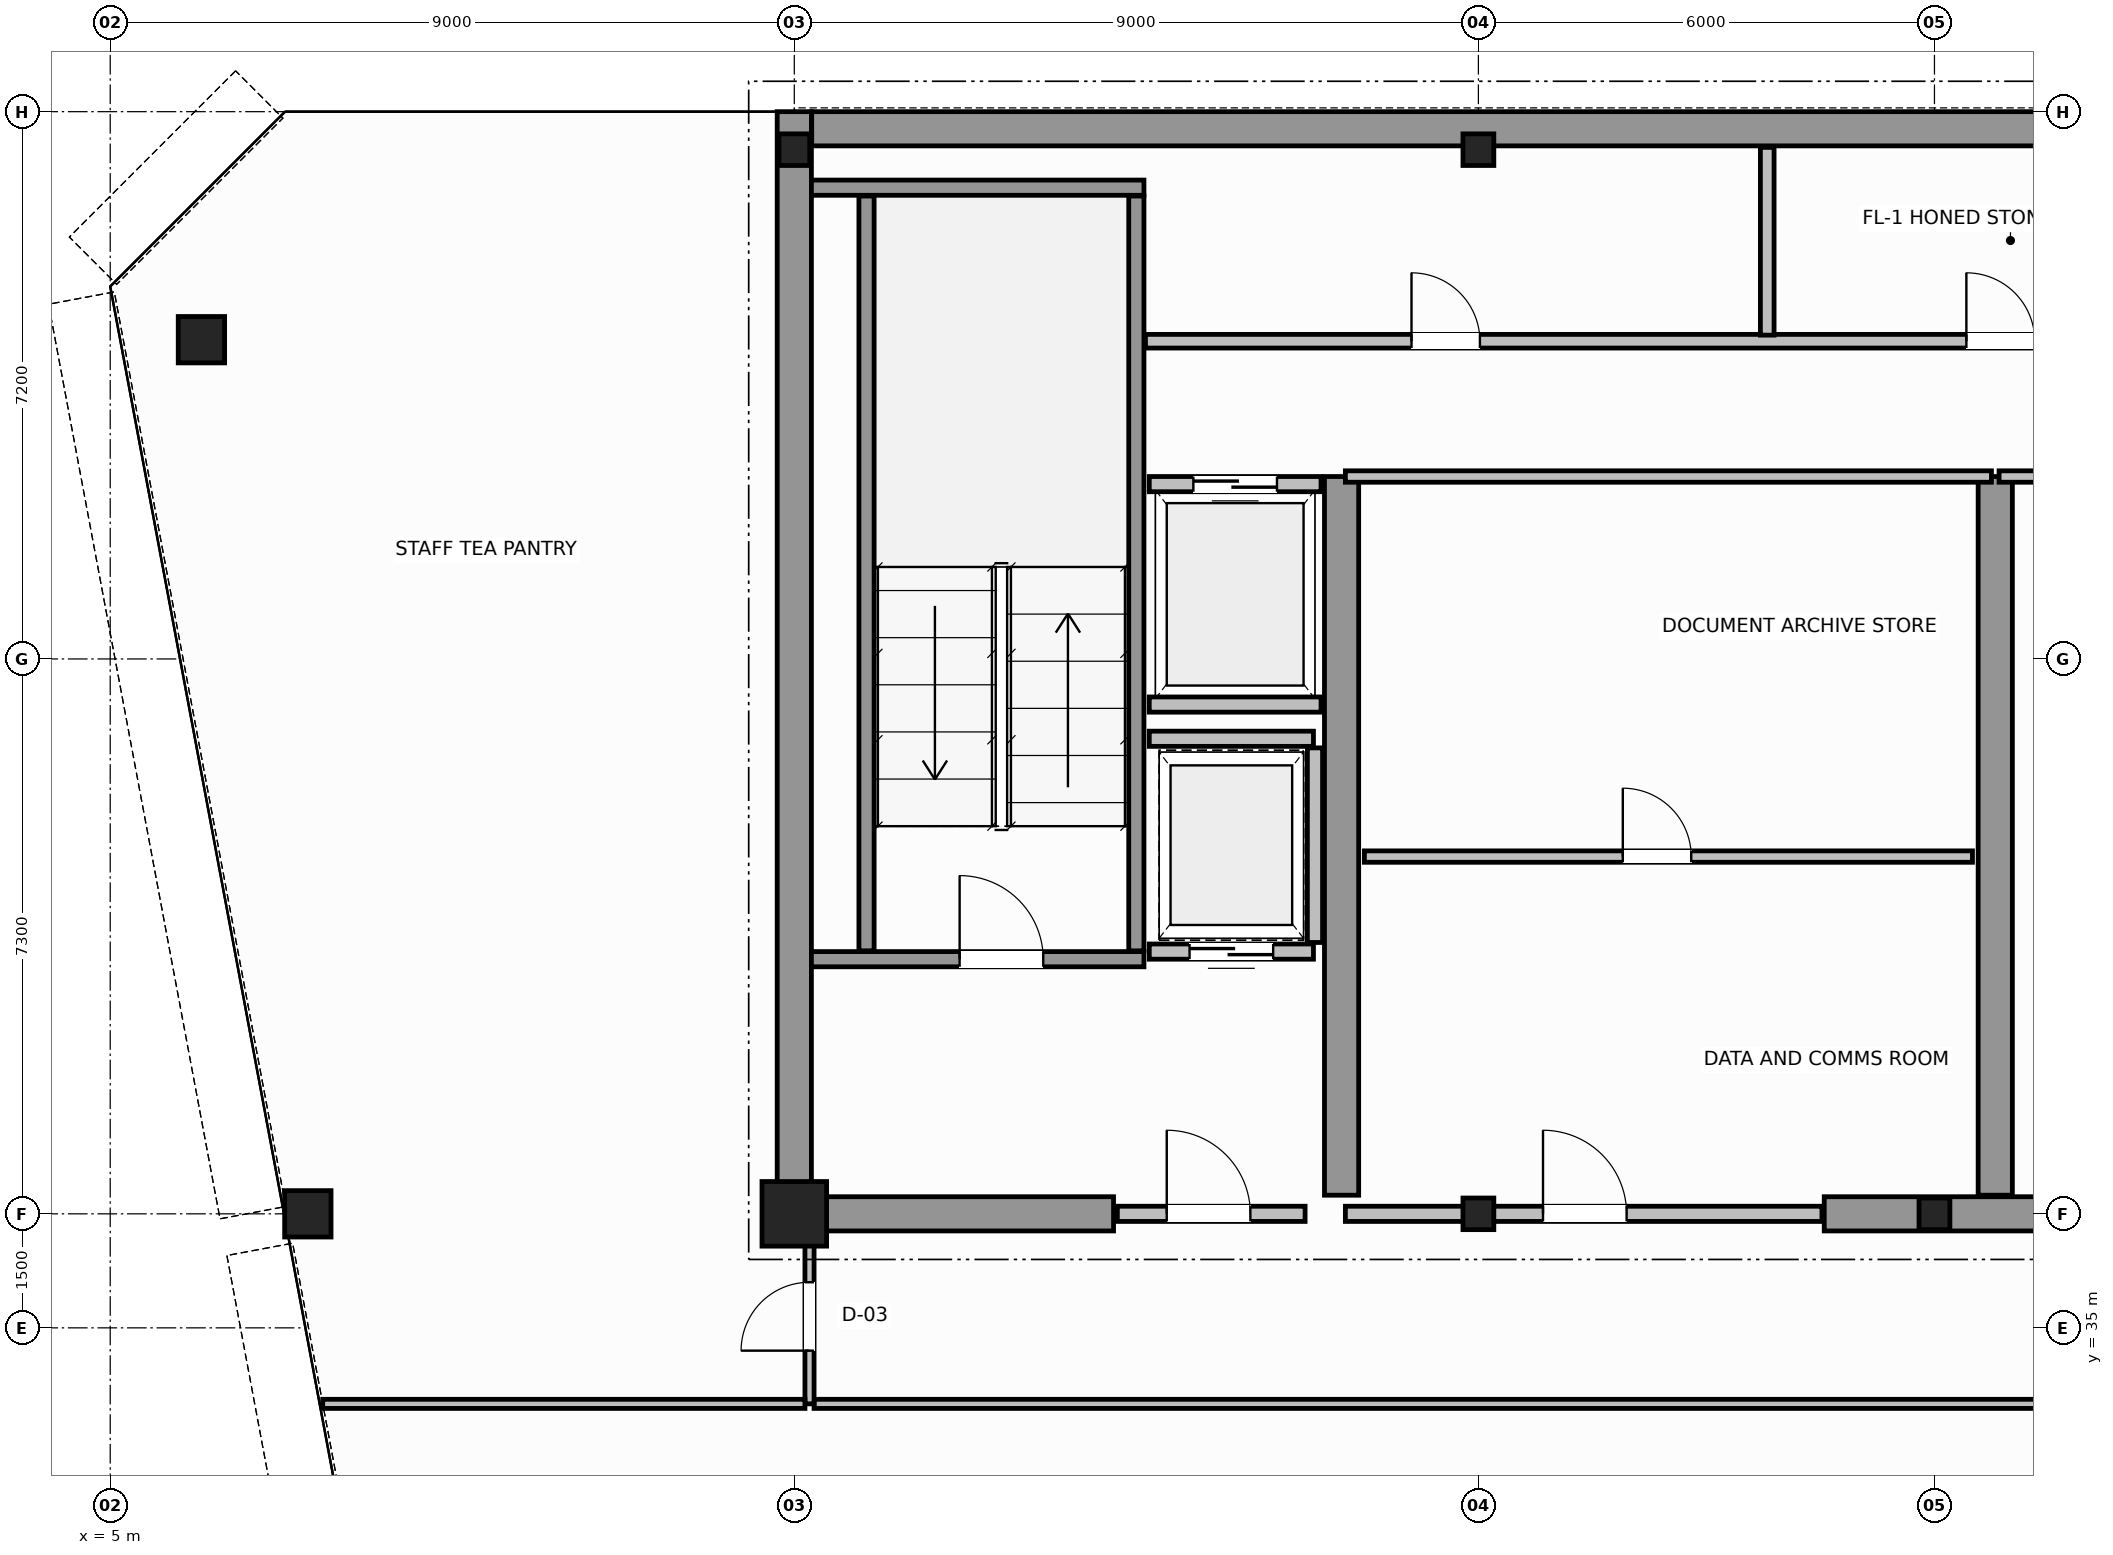
"""IFC4 building model, lengths in metres.
Left out: names, types, materials, properties, quantities, classifications, styles, units other than length and angle.
Written with IfcOpenShell. Run it as: python <this file> out.ifc"""

import sys

from ifc_helpers import new_model, si_unit, direction, frame, frame_2d, origin, origin_2d, place, context, subcontext, project, spatial, rectangle, hollow_circle, i_section, extrude, source, transform, mapped, element, fill, save


model = new_model("IFC4")
c1 = context("Model", 3, precision=1e-05, world=origin(), true_north=direction((0.0, 1.0)))
c2 = subcontext(c1, "Body", "Model", "MODEL_VIEW")
j1 = project(units=[si_unit("LENGTHUNIT", "METRE"), si_unit("PLANEANGLEUNIT", "RADIAN")], contexts=[c1])
p1 = place(None, origin())
s1 = spatial("IfcSite", under=j1, at=p1, CompositionType="ELEMENT")
p2 = place(p1, origin())
s2 = spatial("IfcBuilding", under=s1, at=p2, CompositionType="ELEMENT")
p3 = place(p2, frame((0.0, 0.0, 287.8)))
s3 = spatial("IfcBuildingStorey", under=s2, at=p3, CompositionType="ELEMENT", Elevation=287.8)
m1 = source(origin(), c2, "Body", "SweptSolid", [
    extrude(rectangle(XDim=0.85, YDim=0.85, at=origin_2d()), origin(), (0.0, 0.0, 1.0), 3.8),
])
p4 = place(p3, frame((14.0, 36.5, 0.0), z_axis=(0.0, 0.0, 1.0), x_axis=(1.0, 0.0, 0.0)))
e1 = element("IfcColumn", 1, at=p4, inside=s3, PredefinedType="COLUMN", context=c2, shape_type="MappedRepresentation", body=[
    mapped(m1, transform((0.0, 0.0, 0.0), scale=1.0)),
])
m2 = source(origin(), c2, "Body", "SweptSolid", [
    extrude(i_section(OverallWidth=0.406, OverallDepth=0.416, WebThickness=0.03, FlangeThickness=0.042, FilletRadius=0.015, at=origin_2d()), origin(), (0.0, 0.0, 1.0), 3.8),
])
for number, where, z_axis, x_axis in (
    (2, (23.0, 36.5, 0.0), (0.0, 0.0, 1.0), (1.0, 0.0, 0.0)),
    (3, (29.0, 36.5, 0.0), (0.0, 0.0, 1.0), (1.0, 0.0, 0.0)),
    (4, (14.0, 50.5, 0.0), (0.0, 0.0, 1.0), (1.0, 0.0, 0.0)),
    (5, (23.0, 50.5, 0.0), (0.0, 0.0, 1.0), (1.0, 0.0, 0.0)),
):
    element("IfcColumn", number, at=place(p3, frame(where, z_axis=z_axis, x_axis=x_axis)), inside=s3, PredefinedType="COLUMN", context=c2, shape_type="MappedRepresentation", body=[
        mapped(m2, transform((0.0, 0.0, 0.0), scale=1.0)),
    ])
m3 = source(origin(), c2, "Body", "SweptSolid", [
    extrude(hollow_circle(Radius=0.305, WallThickness=0.03, at=origin_2d()), origin(), (0.0, 0.0, 1.0), 3.8),
])
for number, where, z_axis, x_axis in (
    (6, (6.2, 48.0, 0.0), (0.0, 0.0, 1.0), (1.0, 0.0, 0.0)),
    (7, (7.6, 36.5, 0.0), (0.0, 0.0, 1.0), (1.0, 0.0, 0.0)),
):
    element("IfcColumn", number, at=place(p3, frame(where, z_axis=z_axis, x_axis=x_axis)), inside=s3, PredefinedType="COLUMN", context=c2, shape_type="MappedRepresentation", body=[
        mapped(m3, transform((0.0, 0.0, 0.0), scale=1.0)),
    ])
p5 = place(p3, frame((14.229, 50.775, 0.0), z_axis=(0.0, 0.0, 1.0), x_axis=(1.0, 0.0, 0.0)))
e8 = element("IfcWall", 8, at=p5, inside=s3, PredefinedType="SHEAR", context=c2, shape_type="SweptSolid", body=[
    extrude(rectangle(XDim=19.769, YDim=0.45, at=frame_2d((9.885, 0.0))), origin(), (0.0, 0.0, 1.0), 3.8),
])
p6 = place(p3, frame((14.0, 36.5, 0.0), z_axis=(0.0, 0.0, 1.0), x_axis=(0.0, 1.0, 0.0)))
e9 = element("IfcWall", 9, at=p6, inside=s3, PredefinedType="SHEAR", context=c2, shape_type="SweptSolid", body=[
    extrude(rectangle(XDim=14.5, YDim=0.45, at=frame_2d((7.25, 0.0))), origin(), (0.0, 0.0, 1.0), 3.8),
])
p7 = place(p3, frame((14.245, 36.5, 0.0), z_axis=(0.0, 0.0, 1.0), x_axis=(1.0, 0.0, 0.0)))
e10 = element("IfcWall", 10, at=p7, inside=s3, PredefinedType="SHEAR", context=c2, shape_type="SweptSolid", body=[
    extrude(rectangle(XDim=3.955, YDim=0.45, at=frame_2d((1.978, 0.0))), origin(), (0.0, 0.0, 1.0), 2.58),
])
p8 = place(p3, frame((27.55, 36.5, 0.0), z_axis=(0.0, 0.0, 1.0), x_axis=(1.0, 0.0, 0.0)))
e11 = element("IfcWall", 11, at=p8, inside=s3, PredefinedType="SHEAR", context=c2, shape_type="SweptSolid", body=[
    extrude(rectangle(XDim=4.5, YDim=0.45, at=frame_2d((2.25, 0.0))), origin(), (0.0, 0.0, 1.0), 3.8),
])
for number, where, z_axis, x_axis in (
    (12, (21.2, 36.745, 0.0), (0.0, 0.0, 1.0), (0.0, 1.0, 0.0)),
    (13, (29.8, 36.745, 0.0), (0.0, 0.0, 1.0), (0.0, 1.0, 0.0)),
):
    element("IfcWall", number, at=place(p3, frame(where, z_axis=z_axis, x_axis=x_axis)), inside=s3, PredefinedType="SHEAR", context=c2, shape_type="SweptSolid", body=[
        extrude(rectangle(XDim=9.455, YDim=0.45, at=frame_2d((4.728, 0.0))), origin(), (0.0, 0.0, 1.0), 3.8),
    ])
p9 = place(p3, frame((14.225, 39.85, 0.0), z_axis=(0.0, 0.0, 1.0), x_axis=(1.0, 0.0, 0.0)))
e14 = element("IfcWall", 14, at=p9, inside=s3, PredefinedType="SOLIDWALL", context=c2, shape_type="SweptSolid", body=[
    extrude(rectangle(XDim=4.375, YDim=0.2, at=frame_2d((2.188, 0.0))), origin(), (0.0, 0.0, 1.0), 3.8),
])
p10 = place(p9, frame((1.95, 0.0, 0.0)))
e15 = element("IfcOpeningElement", 15, at=p10, cuts=e14, PredefinedType="OPENING", context=c2, shape_type="SweptSolid", body=[
    extrude(rectangle(XDim=1.1, YDim=2.15, at=frame_2d((0.55, 1.075))), frame((0.0, 0.11, 0.0), z_axis=(0.0, -1.0, 0.0), x_axis=(1.0, 0.0, 0.0)), (0.0, 0.0, 1.0), 0.22),
])
p11 = place(p3, frame((14.225, 50.0, 0.0), z_axis=(0.0, 0.0, 1.0), x_axis=(1.0, 0.0, 0.0)))
e16 = element("IfcWall", 16, at=p11, inside=s3, PredefinedType="SOLIDWALL", context=c2, shape_type="SweptSolid", body=[
    extrude(rectangle(XDim=4.375, YDim=0.2, at=frame_2d((2.188, 0.0))), origin(), (0.0, 0.0, 1.0), 3.8),
])
for number, where, z_axis, x_axis in (
    (17, (14.95, 39.96, 0.0), (0.0, 0.0, 1.0), (0.0, 1.0, 0.0)),
    (18, (18.5, 39.96, 0.0), (0.0, 0.0, 1.0), (0.0, 1.0, 0.0)),
):
    element("IfcWall", number, at=place(p3, frame(where, z_axis=z_axis, x_axis=x_axis)), inside=s3, PredefinedType="SOLIDWALL", context=c2, shape_type="SweptSolid", body=[
        extrude(rectangle(XDim=9.93, YDim=0.2, at=frame_2d((4.965, 0.0))), origin(), (0.0, 0.0, 1.0), 3.8),
    ])
p12 = place(p3, frame((18.25, 36.5, 0.0), z_axis=(0.0, 0.0, 1.0), x_axis=(1.0, 0.0, 0.0)))
e19 = element("IfcWall", 19, at=p12, inside=s3, PredefinedType="SOLIDWALL", context=c2, shape_type="SweptSolid", body=[
    extrude(rectangle(XDim=2.47, YDim=0.2, at=frame_2d((1.235, 0.0))), origin(), (0.0, 0.0, 1.0), 2.57),
])
p13 = place(p12, frame((0.65, 0.0, 0.0)))
e20 = element("IfcOpeningElement", 20, at=p13, cuts=e19, PredefinedType="OPENING", context=c2, shape_type="SweptSolid", body=[
    extrude(rectangle(XDim=1.1, YDim=2.15, at=frame_2d((0.55, 1.075))), frame((0.0, 0.11, 0.0), z_axis=(0.0, -1.0, 0.0), x_axis=(1.0, 0.0, 0.0)), (0.0, 0.0, 1.0), 0.22),
])
p14 = place(p3, frame((18.67, 46.1, 0.0), z_axis=(0.0, 0.0, 1.0), x_axis=(1.0, 0.0, 0.0)))
e21 = element("IfcWall", 21, at=p14, inside=s3, PredefinedType="SOLIDWALL", context=c2, shape_type="SweptSolid", body=[
    extrude(rectangle(XDim=2.26, YDim=0.2, at=frame_2d((1.13, 0.0))), origin(), (0.0, 0.0, 1.0), 3.58),
])
p15 = place(p14, frame((0.58, 0.0, 0.0)))
e22 = element("IfcOpeningElement", 22, at=p15, cuts=e21, PredefinedType="OPENING", context=c2, shape_type="SweptSolid", body=[
    extrude(rectangle(XDim=1.1, YDim=2.15, at=frame_2d((0.55, 1.075))), frame((0.0, 0.11, 0.0), z_axis=(0.0, -1.0, 0.0), x_axis=(1.0, 0.0, 0.0)), (0.0, 0.0, 1.0), 0.22),
])
p16 = place(p3, frame((18.67, 43.2, 0.0), z_axis=(0.0, 0.0, 1.0), x_axis=(1.0, 0.0, 0.0)))
e23 = element("IfcWall", 23, at=p16, inside=s3, PredefinedType="SOLIDWALL", context=c2, shape_type="SweptSolid", body=[
    extrude(rectangle(XDim=2.26, YDim=0.2, at=frame_2d((1.13, 0.0))), origin(), (0.0, 0.0, 1.0), 3.58),
])
p17 = place(p3, frame((18.67, 39.95, 0.0), z_axis=(0.0, 0.0, 1.0), x_axis=(1.0, 0.0, 0.0)))
e24 = element("IfcWall", 24, at=p17, inside=s3, PredefinedType="SOLIDWALL", context=c2, shape_type="SweptSolid", body=[
    extrude(rectangle(XDim=2.16, YDim=0.2, at=frame_2d((1.08, 0.0))), origin(), (0.0, 0.0, 1.0), 3.58),
])
p18 = place(p17, frame((0.53, 0.0, 0.0)))
e25 = element("IfcOpeningElement", 25, at=p18, cuts=e24, PredefinedType="OPENING", context=c2, shape_type="SweptSolid", body=[
    extrude(rectangle(XDim=1.1, YDim=2.15, at=frame_2d((0.55, 1.075))), frame((0.0, 0.11, 0.0), z_axis=(0.0, -1.0, 0.0), x_axis=(1.0, 0.0, 0.0)), (0.0, 0.0, 1.0), 0.22),
])
p19 = place(p3, frame((18.67, 42.75, 0.0), z_axis=(0.0, 0.0, 1.0), x_axis=(1.0, 0.0, 0.0)))
e26 = element("IfcWall", 26, at=p19, inside=s3, PredefinedType="SOLIDWALL", context=c2, shape_type="SweptSolid", body=[
    extrude(rectangle(XDim=2.16, YDim=0.2, at=frame_2d((1.08, 0.0))), origin(), (0.0, 0.0, 1.0), 3.58),
])
p20 = place(p3, frame((20.85, 40.07, 0.0), z_axis=(0.0, 0.0, 1.0), x_axis=(0.0, 1.0, 0.0)))
e27 = element("IfcWall", 27, at=p20, inside=s3, PredefinedType="SOLIDWALL", context=c2, shape_type="SweptSolid", body=[
    extrude(rectangle(XDim=2.56, YDim=0.2, at=frame_2d((1.28, 0.0))), origin(), (0.0, 0.0, 1.0), 3.58),
])
p21 = place(p3, frame((21.25, 36.5, 0.0), z_axis=(0.0, 0.0, 1.0), x_axis=(1.0, 0.0, 0.0)))
e28 = element("IfcWall", 28, at=p21, inside=s3, PredefinedType="SOLIDWALL", context=c2, shape_type="SweptSolid", body=[
    extrude(rectangle(XDim=6.27, YDim=0.2, at=frame_2d((3.135, 0.0))), origin(), (0.0, 0.0, 1.0), 2.57),
])
p22 = place(p21, frame((2.6, 0.0, 0.0)))
e29 = element("IfcOpeningElement", 29, at=p22, cuts=e28, PredefinedType="OPENING", context=c2, shape_type="SweptSolid", body=[
    extrude(rectangle(XDim=1.1, YDim=2.15, at=frame_2d((0.55, 1.075))), frame((0.0, 0.11, 0.0), z_axis=(0.0, -1.0, 0.0), x_axis=(1.0, 0.0, 0.0)), (0.0, 0.0, 1.0), 0.22),
])
p23 = place(p3, frame((21.25, 46.2, 0.0), z_axis=(0.0, 0.0, 1.0), x_axis=(1.0, 0.0, 0.0)))
e30 = element("IfcWall", 30, at=p23, inside=s3, PredefinedType="PARTITIONING", context=c2, shape_type="SweptSolid", body=[
    extrude(rectangle(XDim=8.5, YDim=0.15, at=frame_2d((4.25, 0.0))), origin(), (0.0, 0.0, 1.0), 3.58),
])
p24 = place(p3, frame((21.5, 41.2, 0.0), z_axis=(0.0, 0.0, 1.0), x_axis=(1.0, 0.0, 0.0)))
e31 = element("IfcWall", 31, at=p24, inside=s3, PredefinedType="PARTITIONING", context=c2, shape_type="SweptSolid", body=[
    extrude(rectangle(XDim=8.0, YDim=0.15, at=frame_2d((4.0, 0.0))), origin(), (0.0, 0.0, 1.0), 3.58),
])
p25 = place(p24, frame((3.4, 0.0, 0.0)))
e32 = element("IfcOpeningElement", 32, at=p25, cuts=e31, PredefinedType="OPENING", context=c2, shape_type="SweptSolid", body=[
    extrude(rectangle(XDim=0.9, YDim=2.1, at=frame_2d((0.45, 1.05))), frame((0.0, 0.085, 0.0), z_axis=(0.0, -1.0, 0.0), x_axis=(1.0, 0.0, 0.0)), (0.0, 0.0, 1.0), 0.17),
])
p26 = place(p3, frame((29.85, 46.2, 0.0), z_axis=(0.0, 0.0, 1.0), x_axis=(1.0, 0.0, 0.0)))
e33 = element("IfcWall", 33, at=p26, inside=s3, PredefinedType="PARTITIONING", context=c2, shape_type="SweptSolid", body=[
    extrude(rectangle(XDim=8.5, YDim=0.15, at=frame_2d((4.25, 0.0))), origin(), (0.0, 0.0, 1.0), 3.58),
])
p27 = place(p3, frame((18.62, 47.98, 0.0), z_axis=(0.0, 0.0, 1.0), x_axis=(1.0, 0.0, 0.0)))
e34 = element("IfcWall", 34, at=p27, inside=s3, PredefinedType="PLUMBINGWALL", context=c2, shape_type="SweptSolid", body=[
    extrude(rectangle(XDim=20.06, YDim=0.18, at=frame_2d((10.03, 0.0))), origin(), (0.0, 0.0, 1.0), 3.58),
])
p28 = place(p27, frame((3.5, 0.0, 0.0)))
e35 = element("IfcOpeningElement", 35, at=p28, cuts=e34, PredefinedType="OPENING", context=c2, shape_type="SweptSolid", body=[
    extrude(rectangle(XDim=0.9, YDim=2.15, at=frame_2d((0.45, 1.075))), frame((0.0, 0.1, 0.0), z_axis=(0.0, -1.0, 0.0), x_axis=(1.0, 0.0, 0.0)), (0.0, 0.0, 1.0), 0.2),
])
p29 = place(p27, frame((10.8, 0.0, 0.0)))
e36 = element("IfcOpeningElement", 36, at=p29, cuts=e34, PredefinedType="OPENING", context=c2, shape_type="SweptSolid", body=[
    extrude(rectangle(XDim=0.9, YDim=2.15, at=frame_2d((0.45, 1.075))), frame((0.0, 0.1, 0.0), z_axis=(0.0, -1.0, 0.0), x_axis=(1.0, 0.0, 0.0)), (0.0, 0.0, 1.0), 0.2),
])
p30 = place(p27, frame((16.8, 0.0, 0.0)))
e37 = element("IfcOpeningElement", 37, at=p30, cuts=e34, PredefinedType="OPENING", context=c2, shape_type="SweptSolid", body=[
    extrude(rectangle(XDim=0.9, YDim=2.15, at=frame_2d((0.45, 1.075))), frame((0.0, 0.1, 0.0), z_axis=(0.0, -1.0, 0.0), x_axis=(1.0, 0.0, 0.0)), (0.0, 0.0, 1.0), 0.2),
])
p31 = place(p3, frame((26.8, 48.06, 0.0), z_axis=(0.0, 0.0, 1.0), x_axis=(0.0, 1.0, 0.0)))
e38 = element("IfcWall", 38, at=p31, inside=s3, PredefinedType="PLUMBINGWALL", context=c2, shape_type="SweptSolid", body=[
    extrude(rectangle(XDim=2.47, YDim=0.18, at=frame_2d((1.235, 0.0))), origin(), (0.0, 0.0, 1.0), 3.58),
])
p32 = place(p3, frame((14.26, 34.0, 0.0), z_axis=(0.0, 0.0, 1.0), x_axis=(1.0, 0.0, 0.0)))
e39 = element("IfcWall", 39, at=p32, inside=s3, PredefinedType="PARTITIONING", context=c2, shape_type="SweptSolid", body=[
    extrude(rectangle(XDim=26.48, YDim=0.12, at=frame_2d((13.24, 0.0))), origin(), (0.0, 0.0, 1.0), 3.58),
])
p33 = place(p3, frame((14.2, 34.0, 0.0), z_axis=(0.0, 0.0, 1.0), x_axis=(0.0, 1.0, 0.0)))
e40 = element("IfcWall", 40, at=p33, inside=s3, PredefinedType="PARTITIONING", context=c2, shape_type="SweptSolid", body=[
    extrude(rectangle(XDim=2.44, YDim=0.12, at=frame_2d((1.22, 0.0))), origin(), (0.0, 0.0, 1.0), 3.58),
])
p34 = place(p33, frame((0.7, 0.0, 0.0)))
e41 = element("IfcOpeningElement", 41, at=p34, cuts=e40, PredefinedType="OPENING", context=c2, shape_type="SweptSolid", body=[
    extrude(rectangle(XDim=0.9, YDim=2.15, at=frame_2d((0.45, 1.075))), frame((0.0, 0.07, 0.0), z_axis=(0.0, -1.0, 0.0), x_axis=(1.0, 0.0, 0.0)), (0.0, 0.0, 1.0), 0.14),
])
p35 = place(p3, frame((7.796, 34.0, 0.0), z_axis=(0.0, 0.0, 1.0), x_axis=(1.0, 0.0, 0.0)))
e42 = element("IfcWall", 42, at=p35, inside=s3, PredefinedType="PARTITIONING", context=c2, shape_type="SweptSolid", body=[
    extrude(rectangle(XDim=6.344, YDim=0.12, at=frame_2d((3.172, 0.0))), origin(), (0.0, 0.0, 1.0), 3.58),
])
m4 = source(origin(), c2, "Body", "SweptSolid", [
    extrude(rectangle(XDim=1.1, YDim=2.15, at=frame_2d((0.55, 1.075))), frame((0.0, 0.025, 0.0), z_axis=(0.0, -1.0, 0.0), x_axis=(1.0, 0.0, 0.0)), (0.0, 0.0, 1.0), 0.05),
])
p36 = place(p10, origin())
e43 = element("IfcDoor", 43, at=p36, inside=s3, OperationType="SINGLE_SWING_LEFT", PredefinedType="DOOR", context=c2, shape_type="MappedRepresentation", body=[
    mapped(m4, transform((0.0, 0.0, 0.0), scale=1.0)),
])
fill(e15, e43)
p37 = place(p13, origin())
e44 = element("IfcDoor", 44, at=p37, inside=s3, OperationType="SINGLE_SWING_RIGHT", PredefinedType="DOOR", context=c2, shape_type="MappedRepresentation", body=[
    mapped(m4, transform((0.0, 0.0, 0.0), scale=1.0)),
])
fill(e20, e44)
p38 = place(p15, origin())
e45 = element("IfcDoor", 45, at=p38, inside=s3, OperationType="DOUBLE_DOOR_SLIDING", PredefinedType="DOOR", context=c2, shape_type="MappedRepresentation", body=[
    mapped(m4, transform((0.0, 0.0, 0.0), scale=1.0)),
])
fill(e22, e45)
p39 = place(p18, origin())
e46 = element("IfcDoor", 46, at=p39, inside=s3, OperationType="DOUBLE_DOOR_SLIDING", PredefinedType="DOOR", context=c2, shape_type="MappedRepresentation", body=[
    mapped(m4, transform((0.0, 0.0, 0.0), scale=1.0)),
])
fill(e25, e46)
p40 = place(p22, origin())
e47 = element("IfcDoor", 47, at=p40, inside=s3, OperationType="SINGLE_SWING_LEFT", PredefinedType="DOOR", context=c2, shape_type="MappedRepresentation", body=[
    mapped(m4, transform((0.0, 0.0, 0.0), scale=1.0)),
])
fill(e29, e47)
m5 = source(origin(), c2, "Body", "SweptSolid", [
    extrude(rectangle(XDim=0.9, YDim=2.1, at=frame_2d((0.45, 1.05))), frame((0.0, 0.025, 0.0), z_axis=(0.0, -1.0, 0.0), x_axis=(1.0, 0.0, 0.0)), (0.0, 0.0, 1.0), 0.05),
])
p41 = place(p25, origin())
e48 = element("IfcDoor", 48, at=p41, inside=s3, OperationType="SINGLE_SWING_RIGHT", PredefinedType="DOOR", context=c2, shape_type="MappedRepresentation", body=[
    mapped(m5, transform((0.0, 0.0, 0.0), scale=1.0)),
])
fill(e32, e48)
m6 = source(origin(), c2, "Body", "SweptSolid", [
    extrude(rectangle(XDim=0.9, YDim=2.15, at=frame_2d((0.45, 1.075))), frame((0.0, 0.025, 0.0), z_axis=(0.0, -1.0, 0.0), x_axis=(1.0, 0.0, 0.0)), (0.0, 0.0, 1.0), 0.05),
])
p42 = place(p28, origin())
e49 = element("IfcDoor", 49, at=p42, inside=s3, OperationType="SINGLE_SWING_LEFT", PredefinedType="DOOR", context=c2, shape_type="MappedRepresentation", body=[
    mapped(m6, transform((0.0, 0.0, 0.0), scale=1.0)),
])
fill(e35, e49)
p43 = place(p29, origin())
e50 = element("IfcDoor", 50, at=p43, inside=s3, OperationType="SINGLE_SWING_RIGHT", PredefinedType="DOOR", context=c2, shape_type="MappedRepresentation", body=[
    mapped(m6, transform((0.0, 0.0, 0.0), scale=1.0)),
])
fill(e36, e50)
p44 = place(p34, origin())
e51 = element("IfcDoor", 51, at=p44, inside=s3, OperationType="SINGLE_SWING_LEFT", PredefinedType="DOOR", context=c2, shape_type="MappedRepresentation", body=[
    mapped(m6, transform((0.0, 0.0, 0.0), scale=1.0)),
])
fill(e41, e51)
save(model, sys.argv[1])
